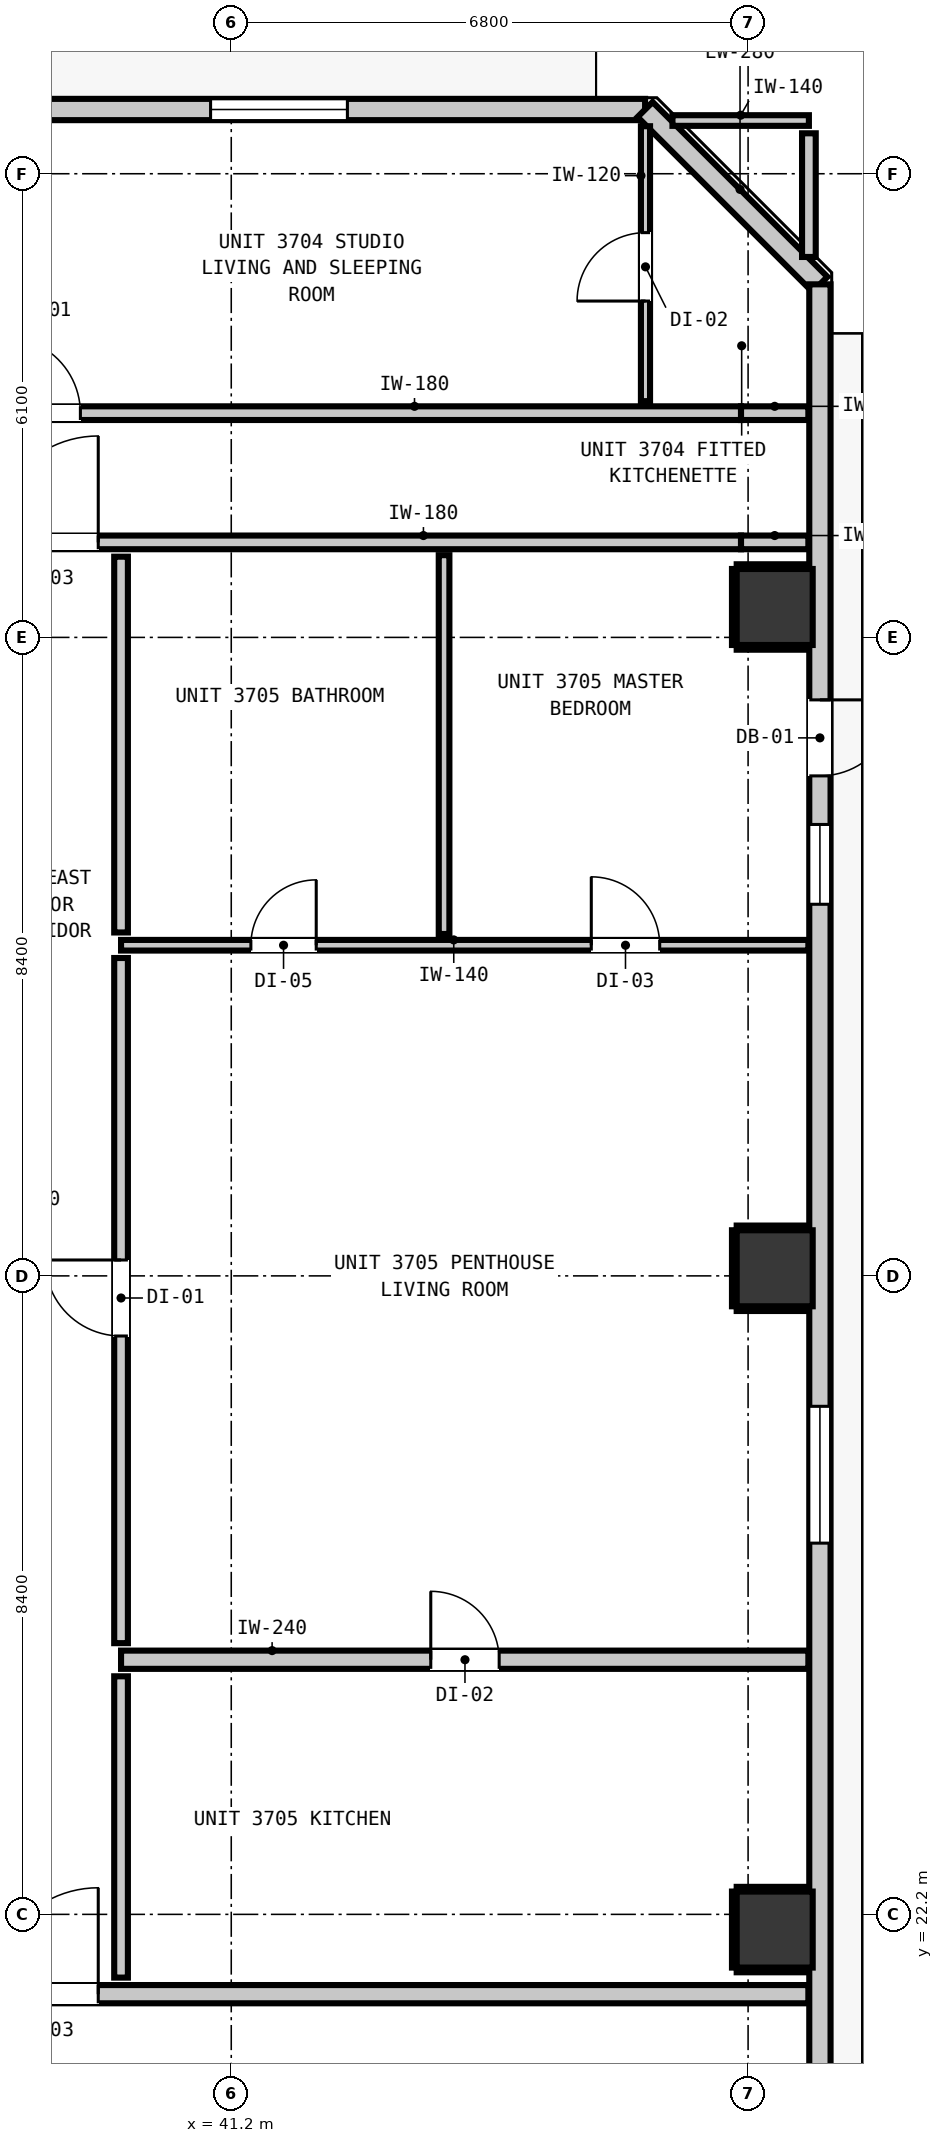
"""IFC4 building model, lengths in metres.
Left out: names, types, materials, properties, quantities, classifications, styles, units other than length and angle.
Written with IfcOpenShell. Run it as: python <this file> out.ifc"""

import sys

from ifc_helpers import new_model, si_unit, direction, frame, frame_2d, origin, origin_2d, place, context, subcontext, project, spatial, rectangle, extrude, element, fill, save


model = new_model("IFC4")
c1 = context("Model", 3, precision=1e-05, world=origin(), true_north=direction((0.0, 1.0)))
c2 = subcontext(c1, "Body", "Model", "MODEL_VIEW")
j1 = project(units=[si_unit("LENGTHUNIT", "METRE"), si_unit("PLANEANGLEUNIT", "RADIAN")], contexts=[c1])
p1 = place(None, origin())
s1 = spatial("IfcSite", under=j1, at=p1, CompositionType="ELEMENT")
p2 = place(p1, origin())
s2 = spatial("IfcBuilding", under=s1, at=p2, CompositionType="ELEMENT")
p3 = place(p2, frame((0.0, 0.0, 129.32)))
s3 = spatial("IfcBuildingStorey", under=s2, at=p3, CompositionType="ELEMENT", Elevation=129.32)
for number, where, z_axis, x_axis in (
    (1, (48.35, 22.0, 0.0), (0.0, 0.0, 1.0), (1.0, 0.0, 0.0)),
    (2, (48.35, 30.7, 0.0), (0.0, 0.0, 1.0), (1.0, 0.0, 0.0)),
    (3, (48.35, 39.4, 0.0), (0.0, 0.0, 1.0), (1.0, 0.0, 0.0)),
):
    element("IfcColumn", number, at=place(p3, frame(where, z_axis=z_axis, x_axis=x_axis)), inside=s3, PredefinedType="COLUMN", context=c2, shape_type="SweptSolid", body=[
        extrude(rectangle(XDim=1.0, YDim=1.0, at=origin_2d()), origin(), (0.0, 0.0, 1.0), 3.32),
    ])
p4 = place(p3, frame((11.555, 45.945, 0.0), z_axis=(0.0, 0.0, 1.0), x_axis=(1.0, 0.0, 0.0)))
e4 = element("IfcWall", 4, at=p4, inside=s3, PredefinedType="STANDARD", context=c2, shape_type="SweptSolid", body=[
    extrude(rectangle(XDim=35.09, YDim=0.28, at=frame_2d((17.545, 0.0))), origin(), (0.0, 0.0, 1.0), 3.08),
])
p5 = place(p4, frame((3.009, 0.0, 0.0)))
e5 = element("IfcOpeningElement", 5, at=p5, cuts=e4, PredefinedType="OPENING", context=c2, shape_type="SweptSolid", body=[
    extrude(rectangle(XDim=1.0, YDim=2.15, at=frame_2d((0.5, 1.075))), frame((0.0, 0.15, 0.0), z_axis=(0.0, -1.0, 0.0), x_axis=(1.0, 0.0, 0.0)), (0.0, 0.0, 1.0), 0.3),
])
p6 = place(p4, frame((5.527, 0.0, 0.85)))
e6 = element("IfcOpeningElement", 6, at=p6, cuts=e4, PredefinedType="OPENING", context=c2, shape_type="SweptSolid", body=[
    extrude(rectangle(XDim=1.8, YDim=1.9, at=frame_2d((0.9, 0.95))), frame((0.0, 0.15, 0.0), z_axis=(0.0, -1.0, 0.0), x_axis=(1.0, 0.0, 0.0)), (0.0, 0.0, 1.0), 0.3),
])
p7 = place(p4, frame((29.373, 0.0, 0.85)))
e7 = element("IfcOpeningElement", 7, at=p7, cuts=e4, PredefinedType="OPENING", context=c2, shape_type="SweptSolid", body=[
    extrude(rectangle(XDim=1.8, YDim=1.9, at=frame_2d((0.9, 0.95))), frame((0.0, 0.15, 0.0), z_axis=(0.0, -1.0, 0.0), x_axis=(1.0, 0.0, 0.0)), (0.0, 0.0, 1.0), 0.3),
])
p8 = place(p3, frame((46.645, 45.945, 0.0), z_axis=(0.0, 0.0, 1.0), x_axis=(0.707106781187, -0.707106781187, 0.0)))
e8 = element("IfcWall", 8, at=p8, inside=s3, PredefinedType="STANDARD", context=c2, shape_type="SweptSolid", body=[
    extrude(rectangle(XDim=3.253, YDim=0.28, at=frame_2d((1.626, 0.0))), origin(), (0.0, 0.0, 1.0), 3.08),
])
p9 = place(p3, frame((48.945, 43.645, 0.0), z_axis=(0.0, 0.0, 1.0), x_axis=(0.0, -1.0, 0.0)))
e9 = element("IfcWall", 9, at=p9, inside=s3, PredefinedType="STANDARD", context=c2, shape_type="SweptSolid", body=[
    extrude(rectangle(XDim=32.29, YDim=0.28, at=frame_2d((16.145, 0.0))), origin(), (0.0, 0.0, 1.0), 3.08),
])
p10 = place(p9, frame((5.467, 0.0, 0.0)))
e10 = element("IfcOpeningElement", 10, at=p10, cuts=e9, PredefinedType="OPENING", context=c2, shape_type="SweptSolid", body=[
    extrude(rectangle(XDim=1.0, YDim=2.15, at=frame_2d((0.5, 1.075))), frame((0.0, 0.15, 0.0), z_axis=(0.0, -1.0, 0.0), x_axis=(1.0, 0.0, 0.0)), (0.0, 0.0, 1.0), 0.3),
])
p11 = place(p9, frame((30.696, 0.0, 0.85)))
e11 = element("IfcOpeningElement", 11, at=p11, cuts=e9, PredefinedType="OPENING", context=c2, shape_type="SweptSolid", body=[
    extrude(rectangle(XDim=1.05, YDim=1.65, at=frame_2d((0.525, 0.825))), frame((0.0, 0.15, 0.0), z_axis=(0.0, -1.0, 0.0), x_axis=(1.0, 0.0, 0.0)), (0.0, 0.0, 1.0), 0.3),
])
p12 = place(p9, frame((14.761, 0.0, 0.85)))
e12 = element("IfcOpeningElement", 12, at=p12, cuts=e9, PredefinedType="OPENING", context=c2, shape_type="SweptSolid", body=[
    extrude(rectangle(XDim=1.8, YDim=1.9, at=frame_2d((0.9, 0.95))), frame((0.0, 0.15, 0.0), z_axis=(0.0, -1.0, 0.0), x_axis=(1.0, 0.0, 0.0)), (0.0, 0.0, 1.0), 0.3),
])
p13 = place(p9, frame((7.106, 0.0, 0.85)))
e13 = element("IfcOpeningElement", 13, at=p13, cuts=e9, PredefinedType="OPENING", context=c2, shape_type="SweptSolid", body=[
    extrude(rectangle(XDim=1.05, YDim=1.65, at=frame_2d((0.525, 0.825))), frame((0.0, 0.15, 0.0), z_axis=(0.0, -1.0, 0.0), x_axis=(1.0, 0.0, 0.0)), (0.0, 0.0, 1.0), 0.3),
])
p14 = place(p3, frame((9.407, 21.15, 0.0), z_axis=(0.0, 0.0, 1.0), x_axis=(1.0, 0.0, 0.0)))
e14 = element("IfcWall", 14, at=p14, inside=s3, PredefinedType="PARTITIONING", context=c2, shape_type="SweptSolid", body=[
    extrude(rectangle(XDim=39.386, YDim=0.24, at=frame_2d((19.693, 0.0))), origin(), (0.0, 0.0, 1.0), 3.08),
])
p15 = place(p14, frame((8.803, 0.0, 0.0)))
e15 = element("IfcOpeningElement", 15, at=p15, cuts=e14, PredefinedType="OPENING", context=c2, shape_type="SweptSolid", body=[
    extrude(rectangle(XDim=1.1, YDim=2.15, at=frame_2d((0.55, 1.075))), frame((0.0, 0.13, 0.0), z_axis=(0.0, -1.0, 0.0), x_axis=(1.0, 0.0, 0.0)), (0.0, 0.0, 1.0), 0.26),
])
p16 = place(p14, frame((1.192, 0.0, 0.0)))
e16 = element("IfcOpeningElement", 16, at=p16, cuts=e14, PredefinedType="OPENING", context=c2, shape_type="SweptSolid", body=[
    extrude(rectangle(XDim=1.4, YDim=2.15, at=frame_2d((0.7, 1.075))), frame((0.0, 0.13, 0.0), z_axis=(0.0, -1.0, 0.0), x_axis=(1.0, 0.0, 0.0)), (0.0, 0.0, 1.0), 0.26),
])
p17 = place(p14, frame((28.643, 0.0, 0.0)))
e17 = element("IfcOpeningElement", 17, at=p17, cuts=e14, PredefinedType="OPENING", context=c2, shape_type="SweptSolid", body=[
    extrude(rectangle(XDim=1.4, YDim=2.15, at=frame_2d((0.7, 1.075))), frame((0.0, 0.13, 0.0), z_axis=(0.0, -1.0, 0.0), x_axis=(1.0, 0.0, 0.0)), (0.0, 0.0, 1.0), 0.26),
])
p18 = place(p3, frame((39.75, 25.55, 0.0), z_axis=(0.0, 0.0, 1.0), x_axis=(1.0, 0.0, 0.0)))
e18 = element("IfcWall", 18, at=p18, inside=s3, PredefinedType="PARTITIONING", context=c2, shape_type="SweptSolid", body=[
    extrude(rectangle(XDim=9.043, YDim=0.24, at=frame_2d((4.521, 0.0))), origin(), (0.0, 0.0, 1.0), 3.08),
])
p19 = place(p18, frame((4.075, 0.0, 0.0)))
e19 = element("IfcOpeningElement", 19, at=p19, cuts=e18, PredefinedType="OPENING", context=c2, shape_type="SweptSolid", body=[
    extrude(rectangle(XDim=0.9, YDim=2.1, at=frame_2d((0.45, 1.05))), frame((0.0, 0.13, 0.0), z_axis=(0.0, -1.0, 0.0), x_axis=(1.0, 0.0, 0.0)), (0.0, 0.0, 1.0), 0.26),
])
p20 = place(p3, frame((36.943, 40.25, 0.0), z_axis=(0.0, 0.0, 1.0), x_axis=(1.0, 0.0, 0.0)))
e20 = element("IfcWall", 20, at=p20, inside=s3, PredefinedType="PARTITIONING", context=c2, shape_type="SweptSolid", body=[
    extrude(rectangle(XDim=10.964, YDim=0.18, at=frame_2d((5.482, 0.0))), origin(), (0.0, 0.0, 1.0), 2.565),
])
p21 = place(p20, frame((1.107, 0.0, 0.0)))
e21 = element("IfcOpeningElement", 21, at=p21, cuts=e20, PredefinedType="OPENING", context=c2, shape_type="SweptSolid", body=[
    extrude(rectangle(XDim=1.4, YDim=2.15, at=frame_2d((0.7, 1.075))), frame((0.0, 0.1, 0.0), z_axis=(0.0, -1.0, 0.0), x_axis=(1.0, 0.0, 0.0)), (0.0, 0.0, 1.0), 0.2),
])
p22 = place(p3, frame((47.907, 40.25, 0.0), z_axis=(0.0, 0.0, 1.0), x_axis=(1.0, 0.0, 0.0)))
e22 = element("IfcWall", 22, at=p22, inside=s3, PredefinedType="PARTITIONING", context=c2, shape_type="SweptSolid", body=[
    extrude(rectangle(XDim=0.886, YDim=0.18, at=frame_2d((0.443, 0.0))), origin(), (0.0, 0.0, 1.0), 3.08),
])
p23 = place(p3, frame((36.943, 41.95, 0.0), z_axis=(0.0, 0.0, 1.0), x_axis=(1.0, 0.0, 0.0)))
e23 = element("IfcWall", 23, at=p23, inside=s3, PredefinedType="PARTITIONING", context=c2, shape_type="SweptSolid", body=[
    extrude(rectangle(XDim=10.964, YDim=0.18, at=frame_2d((5.482, 0.0))), origin(), (0.0, 0.0, 1.0), 2.565),
])
p24 = place(p23, frame((1.272, 0.0, 0.0)))
e24 = element("IfcOpeningElement", 24, at=p24, cuts=e23, PredefinedType="OPENING", context=c2, shape_type="SweptSolid", body=[
    extrude(rectangle(XDim=1.0, YDim=2.15, at=frame_2d((0.5, 1.075))), frame((0.0, 0.1, 0.0), z_axis=(0.0, -1.0, 0.0), x_axis=(1.0, 0.0, 0.0)), (0.0, 0.0, 1.0), 0.2),
])
p25 = place(p3, frame((47.907, 41.95, 0.0), z_axis=(0.0, 0.0, 1.0), x_axis=(1.0, 0.0, 0.0)))
e25 = element("IfcWall", 25, at=p25, inside=s3, PredefinedType="PARTITIONING", context=c2, shape_type="SweptSolid", body=[
    extrude(rectangle(XDim=0.886, YDim=0.18, at=frame_2d((0.443, 0.0))), origin(), (0.0, 0.0, 1.0), 3.08),
])
p26 = place(p3, frame((39.75, 34.95, 0.0), z_axis=(0.0, 0.0, 1.0), x_axis=(1.0, 0.0, 0.0)))
e26 = element("IfcWall", 26, at=p26, inside=s3, PredefinedType="PARTITIONING", context=c2, shape_type="SweptSolid", body=[
    extrude(rectangle(XDim=9.043, YDim=0.14, at=frame_2d((4.521, 0.0))), origin(), (0.0, 0.0, 1.0), 3.08),
])
p27 = place(p26, frame((1.708, 0.0, 0.0)))
e27 = element("IfcOpeningElement", 27, at=p27, cuts=e26, PredefinedType="OPENING", context=c2, shape_type="SweptSolid", body=[
    extrude(rectangle(XDim=0.86, YDim=2.02, at=frame_2d((0.43, 1.01))), frame((0.0, 0.08, 0.0), z_axis=(0.0, -1.0, 0.0), x_axis=(1.0, 0.0, 0.0)), (0.0, 0.0, 1.0), 0.16),
])
p28 = place(p26, frame((6.187, 0.0, 0.0)))
e28 = element("IfcOpeningElement", 28, at=p28, cuts=e26, PredefinedType="OPENING", context=c2, shape_type="SweptSolid", body=[
    extrude(rectangle(XDim=0.9, YDim=2.1, at=frame_2d((0.45, 1.05))), frame((0.0, 0.08, 0.0), z_axis=(0.0, -1.0, 0.0), x_axis=(1.0, 0.0, 0.0)), (0.0, 0.0, 1.0), 0.16),
])
p29 = place(p3, frame((47.005, 45.8, 0.0), z_axis=(0.0, 0.0, 1.0), x_axis=(1.0, 0.0, 0.0)))
e29 = element("IfcWall", 29, at=p29, inside=s3, PredefinedType="PARTITIONING", context=c2, shape_type="SweptSolid", body=[
    extrude(rectangle(XDim=1.795, YDim=0.14, at=frame_2d((0.897, 0.0))), origin(), (0.0, 0.0, 1.0), 3.08),
])
p30 = place(p3, frame((39.75, 21.368, 0.0), z_axis=(0.0, 0.0, 1.0), x_axis=(0.0, 1.0, 0.0)))
e30 = element("IfcWall", 30, at=p30, inside=s3, PredefinedType="PARTITIONING", context=c2, shape_type="SweptSolid", body=[
    extrude(rectangle(XDim=3.964, YDim=0.18, at=frame_2d((1.982, 0.0))), origin(), (0.0, 0.0, 1.0), 3.08),
])
p31 = place(p3, frame((39.75, 25.768, 0.0), z_axis=(0.0, 0.0, 1.0), x_axis=(0.0, 1.0, 0.0)))
e31 = element("IfcWall", 31, at=p31, inside=s3, PredefinedType="PARTITIONING", context=c2, shape_type="SweptSolid", body=[
    extrude(rectangle(XDim=9.014, YDim=0.18, at=frame_2d((4.507, 0.0))), origin(), (0.0, 0.0, 1.0), 3.08),
])
p32 = place(p31, frame((4.041, 0.0, 0.0)))
e32 = element("IfcOpeningElement", 32, at=p32, cuts=e31, PredefinedType="OPENING", context=c2, shape_type="SweptSolid", body=[
    extrude(rectangle(XDim=1.0, YDim=2.15, at=frame_2d((0.5, 1.075))), frame((0.0, 0.1, 0.0), z_axis=(0.0, -1.0, 0.0), x_axis=(1.0, 0.0, 0.0)), (0.0, 0.0, 1.0), 0.2),
])
p33 = place(p3, frame((39.75, 35.118, 0.0), z_axis=(0.0, 0.0, 1.0), x_axis=(0.0, 1.0, 0.0)))
e33 = element("IfcWall", 33, at=p33, inside=s3, PredefinedType="PARTITIONING", context=c2, shape_type="SweptSolid", body=[
    extrude(rectangle(XDim=4.944, YDim=0.18, at=frame_2d((2.472, 0.0))), origin(), (0.0, 0.0, 1.0), 3.08),
])
p34 = place(p3, frame((48.8, 44.005, 0.0), z_axis=(0.0, 0.0, 1.0), x_axis=(0.0, 1.0, 0.0)))
e34 = element("IfcWall", 34, at=p34, inside=s3, PredefinedType="PARTITIONING", context=c2, shape_type="SweptSolid", body=[
    extrude(rectangle(XDim=1.627, YDim=0.18, at=frame_2d((0.813, 0.0))), origin(), (0.0, 0.0, 1.0), 3.08),
])
p35 = place(p3, frame((44.0, 35.098, 0.0), z_axis=(0.0, 0.0, 1.0), x_axis=(0.0, 1.0, 0.0)))
e35 = element("IfcWall", 35, at=p35, inside=s3, PredefinedType="PARTITIONING", context=c2, shape_type="SweptSolid", body=[
    extrude(rectangle(XDim=4.984, YDim=0.14, at=frame_2d((2.492, 0.0))), origin(), (0.0, 0.0, 1.0), 3.08),
])
p36 = place(p3, frame((46.65, 42.108, 0.0), z_axis=(0.0, 0.0, 1.0), x_axis=(0.0, 1.0, 0.0)))
e36 = element("IfcWall", 36, at=p36, inside=s3, PredefinedType="PARTITIONING", context=c2, shape_type="SweptSolid", body=[
    extrude(rectangle(XDim=3.617, YDim=0.12, at=frame_2d((1.809, 0.0))), origin(), (0.0, 0.0, 1.0), 3.08),
])
p37 = place(p36, frame((1.317, 0.0, 0.0)))
e37 = element("IfcOpeningElement", 37, at=p37, cuts=e36, PredefinedType="OPENING", context=c2, shape_type="SweptSolid", body=[
    extrude(rectangle(XDim=0.9, YDim=2.1, at=frame_2d((0.45, 1.05))), frame((0.0, 0.07, 0.0), z_axis=(0.0, -1.0, 0.0), x_axis=(1.0, 0.0, 0.0)), (0.0, 0.0, 1.0), 0.14),
])
for number, where, z_axis, x_axis in (
    (38, (47.85, 21.468, 0.0), (0.0, 0.0, 1.0), (1.0, 0.0, 0.0)),
    (39, (47.85, 22.532, 0.0), (0.0, 0.0, 1.0), (1.0, 0.0, 0.0)),
):
    element("IfcWall", number, at=place(p3, frame(where, z_axis=z_axis, x_axis=x_axis)), inside=s3, PredefinedType="PARTITIONING", context=c2, shape_type="SweptSolid", body=[
        extrude(rectangle(XDim=0.94, YDim=0.06, at=frame_2d((0.47, 0.0))), origin(), (0.0, 0.0, 1.0), 1.45),
    ])
p38 = place(p3, frame((47.818, 21.5, 0.0), z_axis=(0.0, 0.0, 1.0), x_axis=(0.0, 1.0, 0.0)))
e40 = element("IfcWall", 40, at=p38, inside=s3, PredefinedType="PARTITIONING", context=c2, shape_type="SweptSolid", body=[
    extrude(rectangle(XDim=1.0, YDim=0.06, at=frame_2d((0.5, 0.0))), origin(), (0.0, 0.0, 1.0), 1.45),
])
for number, where, z_axis, x_axis in (
    (41, (47.85, 30.168, 0.0), (0.0, 0.0, 1.0), (1.0, 0.0, 0.0)),
    (42, (47.85, 31.232, 0.0), (0.0, 0.0, 1.0), (1.0, 0.0, 0.0)),
):
    element("IfcWall", number, at=place(p3, frame(where, z_axis=z_axis, x_axis=x_axis)), inside=s3, PredefinedType="PARTITIONING", context=c2, shape_type="SweptSolid", body=[
        extrude(rectangle(XDim=0.94, YDim=0.06, at=frame_2d((0.47, 0.0))), origin(), (0.0, 0.0, 1.0), 1.45),
    ])
p39 = place(p3, frame((47.818, 30.2, 0.0), z_axis=(0.0, 0.0, 1.0), x_axis=(0.0, 1.0, 0.0)))
e43 = element("IfcWall", 43, at=p39, inside=s3, PredefinedType="PARTITIONING", context=c2, shape_type="SweptSolid", body=[
    extrude(rectangle(XDim=1.0, YDim=0.06, at=frame_2d((0.5, 0.0))), origin(), (0.0, 0.0, 1.0), 1.45),
])
for number, where, z_axis, x_axis in (
    (44, (47.85, 38.868, 0.0), (0.0, 0.0, 1.0), (1.0, 0.0, 0.0)),
    (45, (47.85, 39.932, 0.0), (0.0, 0.0, 1.0), (1.0, 0.0, 0.0)),
):
    element("IfcWall", number, at=place(p3, frame(where, z_axis=z_axis, x_axis=x_axis)), inside=s3, PredefinedType="PARTITIONING", context=c2, shape_type="SweptSolid", body=[
        extrude(rectangle(XDim=0.94, YDim=0.06, at=frame_2d((0.47, 0.0))), origin(), (0.0, 0.0, 1.0), 1.45),
    ])
p40 = place(p3, frame((47.818, 38.9, 0.0), z_axis=(0.0, 0.0, 1.0), x_axis=(0.0, 1.0, 0.0)))
e46 = element("IfcWall", 46, at=p40, inside=s3, PredefinedType="PARTITIONING", context=c2, shape_type="SweptSolid", body=[
    extrude(rectangle(XDim=1.0, YDim=0.06, at=frame_2d((0.5, 0.0))), origin(), (0.0, 0.0, 1.0), 1.45),
])
p41 = place(p10, origin())
e47 = element("IfcDoor", 47, at=p41, inside=s3, OperationType="SINGLE_SWING_LEFT", PredefinedType="DOOR", context=c2, shape_type="SweptSolid", body=[
    extrude(rectangle(XDim=1.0, YDim=2.15, at=frame_2d((0.5, 1.075))), frame((0.0, 0.025, 0.0), z_axis=(0.0, -1.0, 0.0), x_axis=(1.0, 0.0, 0.0)), (0.0, 0.0, 1.0), 0.05),
])
fill(e10, e47)
p42 = place(p7, origin())
e48 = element("IfcWindow", 48, at=p42, inside=s3, PartitioningType="SINGLE_PANEL", PredefinedType="WINDOW", context=c2, shape_type="SweptSolid", body=[
    extrude(rectangle(XDim=1.8, YDim=1.9, at=frame_2d((0.9, 0.95))), frame((0.0, 0.03, 0.0), z_axis=(0.0, -1.0, 0.0), x_axis=(1.0, 0.0, 0.0)), (0.0, 0.0, 1.0), 0.06),
])
fill(e7, e48)
p43 = place(p12, origin())
e49 = element("IfcWindow", 49, at=p43, inside=s3, PartitioningType="SINGLE_PANEL", PredefinedType="WINDOW", context=c2, shape_type="SweptSolid", body=[
    extrude(rectangle(XDim=1.8, YDim=1.9, at=frame_2d((0.9, 0.95))), frame((0.0, 0.03, 0.0), z_axis=(0.0, -1.0, 0.0), x_axis=(1.0, 0.0, 0.0)), (0.0, 0.0, 1.0), 0.06),
])
fill(e12, e49)
p44 = place(p13, origin())
e50 = element("IfcWindow", 50, at=p44, inside=s3, PartitioningType="SINGLE_PANEL", PredefinedType="WINDOW", context=c2, shape_type="SweptSolid", body=[
    extrude(rectangle(XDim=1.05, YDim=1.65, at=frame_2d((0.525, 0.825))), frame((0.0, 0.03, 0.0), z_axis=(0.0, -1.0, 0.0), x_axis=(1.0, 0.0, 0.0)), (0.0, 0.0, 1.0), 0.06),
])
fill(e13, e50)
p45 = place(p17, origin())
e51 = element("IfcDoor", 51, at=p45, inside=s3, OperationType="SINGLE_SWING_RIGHT", PredefinedType="DOOR", context=c2, shape_type="SweptSolid", body=[
    extrude(rectangle(XDim=1.4, YDim=2.15, at=frame_2d((0.7, 1.075))), frame((0.0, 0.025, 0.0), z_axis=(0.0, -1.0, 0.0), x_axis=(1.0, 0.0, 0.0)), (0.0, 0.0, 1.0), 0.05),
])
fill(e17, e51)
p46 = place(p21, origin())
e52 = element("IfcDoor", 52, at=p46, inside=s3, OperationType="SINGLE_SWING_RIGHT", PredefinedType="DOOR", context=c2, shape_type="SweptSolid", body=[
    extrude(rectangle(XDim=1.4, YDim=2.15, at=frame_2d((0.7, 1.075))), frame((0.0, 0.025, 0.0), z_axis=(0.0, -1.0, 0.0), x_axis=(1.0, 0.0, 0.0)), (0.0, 0.0, 1.0), 0.05),
])
fill(e21, e52)
p47 = place(p24, origin())
e53 = element("IfcDoor", 53, at=p47, inside=s3, OperationType="SINGLE_SWING_LEFT", PredefinedType="DOOR", context=c2, shape_type="SweptSolid", body=[
    extrude(rectangle(XDim=1.0, YDim=2.15, at=frame_2d((0.5, 1.075))), frame((0.0, 0.025, 0.0), z_axis=(0.0, -1.0, 0.0), x_axis=(1.0, 0.0, 0.0)), (0.0, 0.0, 1.0), 0.05),
])
fill(e24, e53)
p48 = place(p37, origin())
e54 = element("IfcDoor", 54, at=p48, inside=s3, OperationType="SINGLE_SWING_LEFT", PredefinedType="DOOR", context=c2, shape_type="SweptSolid", body=[
    extrude(rectangle(XDim=0.9, YDim=2.1, at=frame_2d((0.45, 1.05))), frame((0.0, 0.025, 0.0), z_axis=(0.0, -1.0, 0.0), x_axis=(1.0, 0.0, 0.0)), (0.0, 0.0, 1.0), 0.05),
])
fill(e37, e54)
p49 = place(p32, origin())
e55 = element("IfcDoor", 55, at=p49, inside=s3, OperationType="SINGLE_SWING_RIGHT", PredefinedType="DOOR", context=c2, shape_type="SweptSolid", body=[
    extrude(rectangle(XDim=1.0, YDim=2.15, at=frame_2d((0.5, 1.075))), frame((0.0, 0.025, 0.0), z_axis=(0.0, -1.0, 0.0), x_axis=(1.0, 0.0, 0.0)), (0.0, 0.0, 1.0), 0.05),
])
fill(e32, e55)
p50 = place(p19, origin())
e56 = element("IfcDoor", 56, at=p50, inside=s3, OperationType="SINGLE_SWING_LEFT", PredefinedType="DOOR", context=c2, shape_type="SweptSolid", body=[
    extrude(rectangle(XDim=0.9, YDim=2.1, at=frame_2d((0.45, 1.05))), frame((0.0, 0.025, 0.0), z_axis=(0.0, -1.0, 0.0), x_axis=(1.0, 0.0, 0.0)), (0.0, 0.0, 1.0), 0.05),
])
fill(e19, e56)
p51 = place(p27, origin())
e57 = element("IfcDoor", 57, at=p51, inside=s3, OperationType="SINGLE_SWING_RIGHT", PredefinedType="DOOR", context=c2, shape_type="SweptSolid", body=[
    extrude(rectangle(XDim=0.86, YDim=2.02, at=frame_2d((0.43, 1.01))), frame((0.0, 0.025, 0.0), z_axis=(0.0, -1.0, 0.0), x_axis=(1.0, 0.0, 0.0)), (0.0, 0.0, 1.0), 0.05),
])
fill(e27, e57)
p52 = place(p28, origin())
e58 = element("IfcDoor", 58, at=p52, inside=s3, OperationType="SINGLE_SWING_LEFT", PredefinedType="DOOR", context=c2, shape_type="SweptSolid", body=[
    extrude(rectangle(XDim=0.9, YDim=2.1, at=frame_2d((0.45, 1.05))), frame((0.0, 0.025, 0.0), z_axis=(0.0, -1.0, 0.0), x_axis=(1.0, 0.0, 0.0)), (0.0, 0.0, 1.0), 0.05),
])
fill(e28, e58)
save(model, sys.argv[1])
